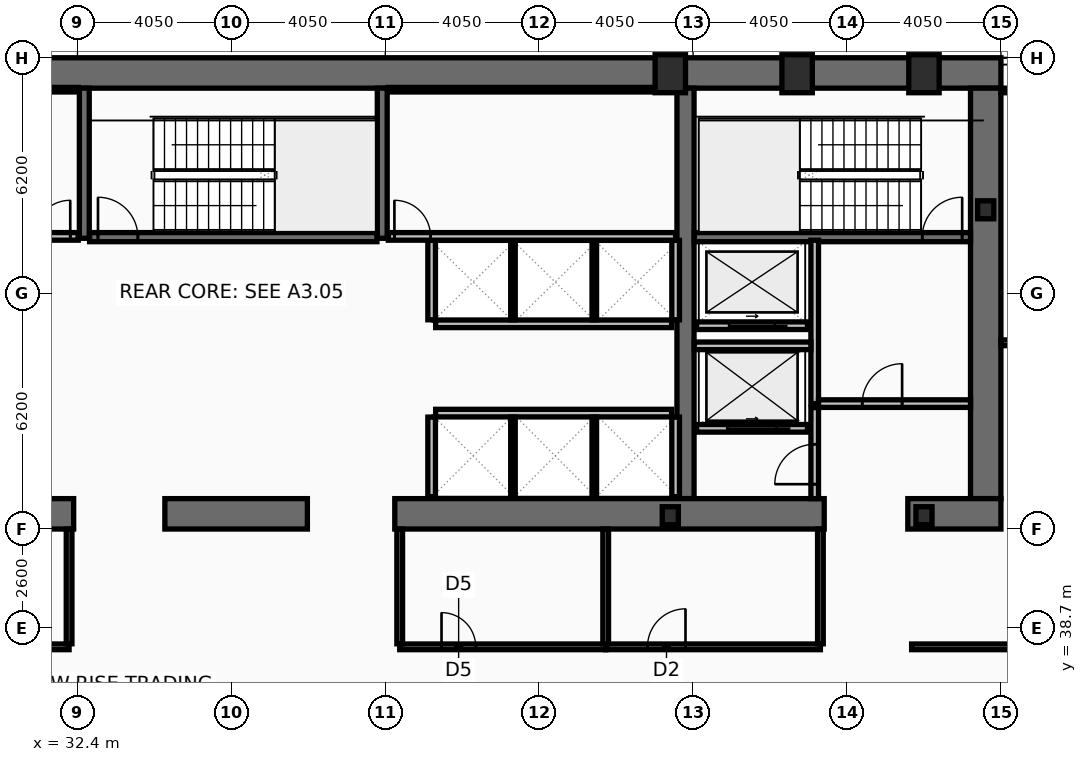
"""IFC4 building model, lengths in metres.
Left out: names, types, materials, properties, quantities, classifications, styles, units other than length and angle.
Written with IfcOpenShell. Run it as: python <this file> out.ifc"""

import sys

from ifc_helpers import new_model, si_unit, direction, frame, frame_2d, origin, origin_2d, place, context, subcontext, project, spatial, rectangle, hollow_rectangle, i_section, extrude, element, fill, save


model = new_model("IFC4")
c1 = context("Model", 3, precision=1e-05, world=origin(), true_north=direction((0.0, 1.0)))
c2 = subcontext(c1, "Body", "Model", "MODEL_VIEW")
j1 = project(units=[si_unit("LENGTHUNIT", "METRE"), si_unit("PLANEANGLEUNIT", "RADIAN")], contexts=[c1])
p1 = place(None, origin())
s1 = spatial("IfcSite", under=j1, at=p1, CompositionType="ELEMENT")
p2 = place(p1, origin())
s2 = spatial("IfcBuilding", under=s1, at=p2, CompositionType="ELEMENT")
p3 = place(p2, frame((0.0, 0.0, 45.8)))
s3 = spatial("IfcBuildingStorey", under=s2, at=p3, CompositionType="ELEMENT", Elevation=45.8)
p4 = place(p3, frame((16.2, 53.3, 0.0), z_axis=(0.0, 0.0, 1.0), x_axis=(1.0, 0.0, 0.0)))
e1 = element("IfcWall", 1, at=p4, inside=s3, PredefinedType="SHEAR", context=c2, shape_type="SweptSolid", body=[
    extrude(rectangle(XDim=40.5, YDim=0.8, at=frame_2d((20.25, 0.0))), origin(), (0.0, 0.0, 1.0), 3.82),
])
p5 = place(p3, frame((56.3, 52.9, 0.0), z_axis=(0.0, 0.0, 1.0), x_axis=(0.0, -1.0, 0.0)))
e2 = element("IfcWall", 2, at=p5, inside=s3, PredefinedType="SHEAR", context=c2, shape_type="SweptSolid", body=[
    extrude(rectangle(XDim=10.8, YDim=0.8, at=frame_2d((5.4, 0.0))), origin(), (0.0, 0.0, 1.0), 3.82),
])
p6 = place(p3, frame((48.4, 42.1, 0.0), z_axis=(0.0, 0.0, 1.0), x_axis=(0.0, 1.0, 0.0)))
e3 = element("IfcWall", 3, at=p6, inside=s3, PredefinedType="SHEAR", context=c2, shape_type="SweptSolid", body=[
    extrude(rectangle(XDim=10.8, YDim=0.45, at=frame_2d((5.4, 0.0))), origin(), (0.0, 0.0, 1.0), 3.82),
])
p7 = place(p3, frame((32.3, 41.7, 0.0), z_axis=(0.0, 0.0, 1.0), x_axis=(-1.0, 0.0, 0.0)))
e4 = element("IfcWall", 4, at=p7, inside=s3, PredefinedType="SHEAR", context=c2, shape_type="SweptSolid", body=[
    extrude(rectangle(XDim=11.45, YDim=0.8, at=frame_2d((5.725, 0.0))), origin(), (0.0, 0.0, 1.0), 3.82),
])
p8 = place(p3, frame((38.45, 41.7, 0.0), z_axis=(0.0, 0.0, 1.0), x_axis=(-1.0, 0.0, 0.0)))
e5 = element("IfcWall", 5, at=p8, inside=s3, PredefinedType="SHEAR", context=c2, shape_type="SweptSolid", body=[
    extrude(rectangle(XDim=3.75, YDim=0.8, at=frame_2d((1.875, 0.0))), origin(), (0.0, 0.0, 1.0), 3.82),
])
p9 = place(p3, frame((52.05, 41.7, 0.0), z_axis=(0.0, 0.0, 1.0), x_axis=(-1.0, 0.0, 0.0)))
e6 = element("IfcWall", 6, at=p9, inside=s3, PredefinedType="SHEAR", context=c2, shape_type="SweptSolid", body=[
    extrude(rectangle(XDim=11.3, YDim=0.8, at=frame_2d((5.65, 0.0))), origin(), (0.0, 0.0, 1.0), 3.82),
])
p10 = place(p3, frame((56.7, 41.7, 0.0), z_axis=(0.0, 0.0, 1.0), x_axis=(-1.0, 0.0, 0.0)))
e7 = element("IfcWall", 7, at=p10, inside=s3, PredefinedType="SHEAR", context=c2, shape_type="SweptSolid", body=[
    extrude(rectangle(XDim=2.45, YDim=0.8, at=frame_2d((1.225, 0.0))), origin(), (0.0, 0.0, 1.0), 3.82),
])
for number, where, z_axis, x_axis in (
    (8, (32.58, 48.95, 0.0), (0.0, 0.0, 1.0), (0.0, 1.0, 0.0)),
    (9, (40.42, 48.95, 0.0), (0.0, 0.0, 1.0), (0.0, 1.0, 0.0)),
):
    element("IfcWall", number, at=place(p3, frame(where, z_axis=z_axis, x_axis=x_axis)), inside=s3, PredefinedType="SHEAR", context=c2, shape_type="SweptSolid", body=[
        extrude(rectangle(XDim=3.95, YDim=0.26, at=frame_2d((1.975, 0.0))), origin(), (0.0, 0.0, 1.0), 3.82),
    ])
p11 = place(p3, frame((48.63, 48.98, 0.0), z_axis=(0.0, 0.0, 1.0), x_axis=(1.0, 0.0, 0.0)))
e10 = element("IfcWall", 10, at=p11, inside=s3, PredefinedType="SHEAR", context=c2, shape_type="SweptSolid", body=[
    extrude(rectangle(XDim=7.27, YDim=0.24, at=frame_2d((3.635, 0.0))), origin(), (0.0, 0.0, 1.0), 3.82),
])
p12 = place(p11, frame((6.0, 0.0, 0.0)))
e11 = element("IfcOpeningElement", 11, at=p12, cuts=e10, PredefinedType="OPENING", context=c2, shape_type="SweptSolid", body=[
    extrude(rectangle(XDim=1.05, YDim=2.15, at=frame_2d((0.525, 1.075))), frame((0.0, 0.13, 0.0), z_axis=(0.0, -1.0, 0.0), x_axis=(1.0, 0.0, 0.0)), (0.0, 0.0, 1.0), 0.26),
])
p13 = place(p3, frame((32.72, 48.98, 0.0), z_axis=(0.0, 0.0, 1.0), x_axis=(1.0, 0.0, 0.0)))
e12 = element("IfcWall", 12, at=p13, inside=s3, PredefinedType="SHEAR", context=c2, shape_type="SweptSolid", body=[
    extrude(rectangle(XDim=7.56, YDim=0.24, at=frame_2d((3.78, 0.0))), origin(), (0.0, 0.0, 1.0), 3.82),
])
p14 = place(p13, frame((0.22, 0.0, 0.0)))
e13 = element("IfcOpeningElement", 13, at=p14, cuts=e12, PredefinedType="OPENING", context=c2, shape_type="SweptSolid", body=[
    extrude(rectangle(XDim=1.05, YDim=2.15, at=frame_2d((0.525, 1.075))), frame((0.0, 0.13, 0.0), z_axis=(0.0, -1.0, 0.0), x_axis=(1.0, 0.0, 0.0)), (0.0, 0.0, 1.0), 0.26),
])
for number, where, z_axis, x_axis in (
    (14, (48.0, 53.28, 0.0), (0.0, 0.0, 1.0), (1.0, 0.0, 0.0)),
    (15, (51.337, 53.28, 0.0), (0.0, 0.0, 1.0), (1.0, 0.0, 0.0)),
    (16, (54.675, 53.28, 0.0), (0.0, 0.0, 1.0), (1.0, 0.0, 0.0)),
):
    element("IfcColumn", number, at=place(p3, frame(where, z_axis=z_axis, x_axis=x_axis)), inside=s3, PredefinedType="COLUMN", context=c2, shape_type="SweptSolid", body=[
        extrude(hollow_rectangle(XDim=0.8, YDim=1.0, WallThickness=0.055, at=origin_2d()), origin(), (0.0, 0.0, 1.0), 4.0),
    ])
for number, where, z_axis, x_axis in (
    (17, (56.3, 49.7, 0.0), (0.0, 0.0, 1.0), (1.0, 0.0, 0.0)),
    (18, (48.0, 41.65, 0.0), (0.0, 0.0, 1.0), (1.0, 0.0, 0.0)),
    (19, (54.675, 41.65, 0.0), (0.0, 0.0, 1.0), (1.0, 0.0, 0.0)),
):
    element("IfcColumn", number, at=place(p3, frame(where, z_axis=z_axis, x_axis=x_axis)), inside=s3, PredefinedType="COLUMN", context=c2, shape_type="SweptSolid", body=[
        extrude(i_section(OverallWidth=0.424, OverallDepth=0.474, WebThickness=0.048, FlangeThickness=0.077, at=origin_2d()), origin(), (0.0, 0.0, 1.0), 4.0),
    ])
p15 = place(p3, frame((51.61, 43.95, 0.0), z_axis=(0.0, 0.0, 1.0), x_axis=(-1.0, 0.0, 0.0)))
e20 = element("IfcWall", 20, at=p15, inside=s3, PredefinedType="PARTITIONING", context=c2, shape_type="SweptSolid", body=[
    extrude(rectangle(XDim=2.92, YDim=0.2, at=frame_2d((1.46, 0.0))), origin(), (0.0, 0.0, 1.0), 3.82),
])
p16 = place(p15, frame((0.81, 0.0, 0.0)))
e21 = element("IfcOpeningElement", 21, at=p16, cuts=e20, PredefinedType="OPENING", context=c2, shape_type="SweptSolid", body=[
    extrude(rectangle(XDim=1.3, YDim=2.18, at=frame_2d((0.65, 1.09))), frame((0.0, 0.11, 0.0), z_axis=(0.0, -1.0, 0.0), x_axis=(1.0, 0.0, 0.0)), (0.0, 0.0, 1.0), 0.22),
])
p17 = place(p3, frame((51.61, 46.65, 0.0), z_axis=(0.0, 0.0, 1.0), x_axis=(-1.0, 0.0, 0.0)))
e22 = element("IfcWall", 22, at=p17, inside=s3, PredefinedType="PARTITIONING", context=c2, shape_type="SweptSolid", body=[
    extrude(rectangle(XDim=2.92, YDim=0.2, at=frame_2d((1.46, 0.0))), origin(), (0.0, 0.0, 1.0), 3.82),
])
p18 = place(p17, frame((0.86, 0.0, 0.0)))
e23 = element("IfcOpeningElement", 23, at=p18, cuts=e22, PredefinedType="OPENING", context=c2, shape_type="SweptSolid", body=[
    extrude(rectangle(XDim=1.2, YDim=2.18, at=frame_2d((0.6, 1.09))), frame((0.0, 0.11, 0.0), z_axis=(0.0, -1.0, 0.0), x_axis=(1.0, 0.0, 0.0)), (0.0, 0.0, 1.0), 0.22),
])
p19 = place(p3, frame((51.8, 44.6, 0.0), z_axis=(0.0, 0.0, 1.0), x_axis=(0.0, 1.0, 0.0)))
e24 = element("IfcWall", 24, at=p19, inside=s3, PredefinedType="PARTITIONING", context=c2, shape_type="SweptSolid", body=[
    extrude(rectangle(XDim=4.3, YDim=0.2, at=frame_2d((2.15, 0.0))), origin(), (0.0, 0.0, 1.0), 3.82),
])
p20 = place(p3, frame((51.9, 44.6, 0.0), z_axis=(0.0, 0.0, 1.0), x_axis=(1.0, 0.0, 0.0)))
e25 = element("IfcWall", 25, at=p20, inside=s3, PredefinedType="PARTITIONING", context=c2, shape_type="SweptSolid", body=[
    extrude(rectangle(XDim=4.0, YDim=0.2, at=frame_2d((2.0, 0.0))), origin(), (0.0, 0.0, 1.0), 3.82),
])
p21 = place(p20, frame((1.15, 0.0, 0.0)))
e26 = element("IfcOpeningElement", 26, at=p21, cuts=e25, PredefinedType="OPENING", context=c2, shape_type="SweptSolid", body=[
    extrude(rectangle(XDim=1.05, YDim=2.15, at=frame_2d((0.525, 1.075))), frame((0.0, 0.11, 0.0), z_axis=(0.0, -1.0, 0.0), x_axis=(1.0, 0.0, 0.0)), (0.0, 0.0, 1.0), 0.22),
])
p22 = place(p3, frame((48.63, 46.12, 0.0), z_axis=(0.0, 0.0, 1.0), x_axis=(1.0, 0.0, 0.0)))
e27 = element("IfcWall", 27, at=p22, inside=s3, PredefinedType="PARTITIONING", context=c2, shape_type="SweptSolid", body=[
    extrude(rectangle(XDim=3.07, YDim=0.2, at=frame_2d((1.535, 0.0))), origin(), (0.0, 0.0, 1.0), 3.82),
])
p23 = place(p3, frame((51.8, 42.1, 0.0), z_axis=(0.0, 0.0, 1.0), x_axis=(0.0, 1.0, 0.0)))
e28 = element("IfcWall", 28, at=p23, inside=s3, PredefinedType="PARTITIONING", context=c2, shape_type="SweptSolid", body=[
    extrude(rectangle(XDim=2.395, YDim=0.2, at=frame_2d((1.198, 0.0))), origin(), (0.0, 0.0, 1.0), 3.82),
])
p24 = place(p23, frame((0.38, 0.0, 0.0)))
e29 = element("IfcOpeningElement", 29, at=p24, cuts=e28, PredefinedType="OPENING", context=c2, shape_type="SweptSolid", body=[
    extrude(rectangle(XDim=1.05, YDim=2.15, at=frame_2d((0.525, 1.075))), frame((0.0, 0.11, 0.0), z_axis=(0.0, -1.0, 0.0), x_axis=(1.0, 0.0, 0.0)), (0.0, 0.0, 1.0), 0.22),
])
p25 = place(p3, frame((41.825, 46.7, 0.0), z_axis=(0.0, 0.0, 1.0), x_axis=(1.0, 0.0, 0.0)))
e30 = element("IfcWall", 30, at=p25, inside=s3, PredefinedType="PARTITIONING", context=c2, shape_type="SweptSolid", body=[
    extrude(rectangle(XDim=6.21, YDim=0.2, at=frame_2d((3.105, 0.0))), origin(), (0.0, 0.0, 1.0), 3.82),
])
for number, where, z_axis, x_axis in (
    (31, (41.72, 46.805, 0.0), (0.0, 0.0, 1.0), (0.0, 1.0, 0.0)),
    (32, (48.14, 46.805, 0.0), (0.0, 0.0, 1.0), (0.0, 1.0, 0.0)),
):
    element("IfcWall", number, at=place(p3, frame(where, z_axis=z_axis, x_axis=x_axis)), inside=s3, PredefinedType="PARTITIONING", context=c2, shape_type="SweptSolid", body=[
        extrude(rectangle(XDim=2.09, YDim=0.2, at=frame_2d((1.045, 0.0))), origin(), (0.0, 0.0, 1.0), 3.82),
    ])
for number, where, z_axis, x_axis in (
    (33, (43.86, 46.805, 0.0), (0.0, 0.0, 1.0), (0.0, 1.0, 0.0)),
    (34, (46.0, 46.805, 0.0), (0.0, 0.0, 1.0), (0.0, 1.0, 0.0)),
):
    element("IfcWall", number, at=place(p3, frame(where, z_axis=z_axis, x_axis=x_axis)), inside=s3, PredefinedType="PARTITIONING", context=c2, shape_type="SweptSolid", body=[
        extrude(rectangle(XDim=2.09, YDim=0.12, at=frame_2d((1.045, 0.0))), origin(), (0.0, 0.0, 1.0), 3.82),
    ])
p26 = place(p3, frame((41.825, 44.35, 0.0), z_axis=(0.0, 0.0, 1.0), x_axis=(1.0, 0.0, 0.0)))
e35 = element("IfcWall", 35, at=p26, inside=s3, PredefinedType="PARTITIONING", context=c2, shape_type="SweptSolid", body=[
    extrude(rectangle(XDim=6.21, YDim=0.2, at=frame_2d((3.105, 0.0))), origin(), (0.0, 0.0, 1.0), 3.82),
])
for number, where, z_axis, x_axis in (
    (36, (41.72, 42.15, 0.0), (0.0, 0.0, 1.0), (0.0, 1.0, 0.0)),
    (37, (48.14, 42.15, 0.0), (0.0, 0.0, 1.0), (0.0, 1.0, 0.0)),
):
    element("IfcWall", number, at=place(p3, frame(where, z_axis=z_axis, x_axis=x_axis)), inside=s3, PredefinedType="PARTITIONING", context=c2, shape_type="SweptSolid", body=[
        extrude(rectangle(XDim=2.095, YDim=0.2, at=frame_2d((1.048, 0.0))), origin(), (0.0, 0.0, 1.0), 3.82),
    ])
for number, where, z_axis, x_axis in (
    (38, (43.86, 42.15, 0.0), (0.0, 0.0, 1.0), (0.0, 1.0, 0.0)),
    (39, (46.0, 42.15, 0.0), (0.0, 0.0, 1.0), (0.0, 1.0, 0.0)),
):
    element("IfcWall", number, at=place(p3, frame(where, z_axis=z_axis, x_axis=x_axis)), inside=s3, PredefinedType="PARTITIONING", context=c2, shape_type="SweptSolid", body=[
        extrude(rectangle(XDim=2.095, YDim=0.12, at=frame_2d((1.048, 0.0))), origin(), (0.0, 0.0, 1.0), 3.82),
    ])
p27 = place(p3, frame((24.7, 52.86, 0.0), z_axis=(0.0, 0.0, 1.0), x_axis=(1.0, 0.0, 0.0)))
e40 = element("IfcWall", 40, at=p27, inside=s3, PredefinedType="PARTITIONING", context=c2, shape_type="SweptSolid", body=[
    extrude(rectangle(XDim=7.72, YDim=0.12, at=frame_2d((3.86, 0.0))), origin(), (0.0, 0.0, 1.0), 3.82),
])
p28 = place(p3, frame((24.7, 49.0, 0.0), z_axis=(0.0, 0.0, 1.0), x_axis=(1.0, 0.0, 0.0)))
e41 = element("IfcWall", 41, at=p28, inside=s3, PredefinedType="PARTITIONING", context=c2, shape_type="SweptSolid", body=[
    extrude(rectangle(XDim=7.72, YDim=0.2, at=frame_2d((3.86, 0.0))), origin(), (0.0, 0.0, 1.0), 3.82),
])
p29 = place(p28, frame((6.56, 0.0, 0.0)))
e42 = element("IfcOpeningElement", 42, at=p29, cuts=e41, PredefinedType="OPENING", context=c2, shape_type="SweptSolid", body=[
    extrude(rectangle(XDim=0.95, YDim=2.1, at=frame_2d((0.475, 1.05))), frame((0.0, 0.11, 0.0), z_axis=(0.0, -1.0, 0.0), x_axis=(1.0, 0.0, 0.0)), (0.0, 0.0, 1.0), 0.22),
])
p30 = place(p3, frame((40.58, 52.86, 0.0), z_axis=(0.0, 0.0, 1.0), x_axis=(1.0, 0.0, 0.0)))
e43 = element("IfcWall", 43, at=p30, inside=s3, PredefinedType="PARTITIONING", context=c2, shape_type="SweptSolid", body=[
    extrude(rectangle(XDim=7.56, YDim=0.12, at=frame_2d((3.78, 0.0))), origin(), (0.0, 0.0, 1.0), 3.82),
])
p31 = place(p3, frame((40.58, 49.0, 0.0), z_axis=(0.0, 0.0, 1.0), x_axis=(1.0, 0.0, 0.0)))
e44 = element("IfcWall", 44, at=p31, inside=s3, PredefinedType="PARTITIONING", context=c2, shape_type="SweptSolid", body=[
    extrude(rectangle(XDim=7.56, YDim=0.2, at=frame_2d((3.78, 0.0))), origin(), (0.0, 0.0, 1.0), 3.82),
])
p32 = place(p31, frame((0.16, 0.0, 0.0)))
e45 = element("IfcOpeningElement", 45, at=p32, cuts=e44, PredefinedType="OPENING", context=c2, shape_type="SweptSolid", body=[
    extrude(rectangle(XDim=0.95, YDim=2.1, at=frame_2d((0.475, 1.05))), frame((0.0, 0.11, 0.0), z_axis=(0.0, -1.0, 0.0), x_axis=(1.0, 0.0, 0.0)), (0.0, 0.0, 1.0), 0.22),
])
p33 = place(p3, frame((28.8, 38.2, 0.0), z_axis=(0.0, 0.0, 1.0), x_axis=(1.0, 0.0, 0.0)))
e46 = element("IfcWall", 46, at=p33, inside=s3, PredefinedType="PARTITIONING", context=c2, shape_type="SweptSolid", body=[
    extrude(rectangle(XDim=3.38, YDim=0.15, at=frame_2d((1.69, 0.0))), origin(), (0.0, 0.0, 1.0), 3.01),
])
p34 = place(p33, frame((0.7, 0.0, 0.0)))
e47 = element("IfcOpeningElement", 47, at=p34, cuts=e46, PredefinedType="OPENING", context=c2, shape_type="SweptSolid", body=[
    extrude(rectangle(XDim=0.95, YDim=2.05, at=frame_2d((0.475, 1.025))), frame((0.0, 0.085, 0.0), z_axis=(0.0, -1.0, 0.0), x_axis=(1.0, 0.0, 0.0)), (0.0, 0.0, 1.0), 0.17),
])
p35 = place(p3, frame((32.18, 38.28, 0.0), z_axis=(0.0, 0.0, 1.0), x_axis=(0.0, 1.0, 0.0)))
e48 = element("IfcWall", 48, at=p35, inside=s3, PredefinedType="PARTITIONING", context=c2, shape_type="SweptSolid", body=[
    extrude(rectangle(XDim=3.02, YDim=0.15, at=frame_2d((1.51, 0.0))), origin(), (0.0, 0.0, 1.0), 3.82),
])
p36 = place(p3, frame((40.88, 38.2, 0.0), z_axis=(0.0, 0.0, 1.0), x_axis=(1.0, 0.0, 0.0)))
e49 = element("IfcWall", 49, at=p36, inside=s3, PredefinedType="PARTITIONING", context=c2, shape_type="SweptSolid", body=[
    extrude(rectangle(XDim=5.42, YDim=0.15, at=frame_2d((2.71, 0.0))), origin(), (0.0, 0.0, 1.0), 3.01),
])
p37 = place(p36, frame((1.1, 0.0, 0.0)))
e50 = element("IfcOpeningElement", 50, at=p37, cuts=e49, PredefinedType="OPENING", context=c2, shape_type="SweptSolid", body=[
    extrude(rectangle(XDim=0.9, YDim=2.05, at=frame_2d((0.45, 1.025))), frame((0.0, 0.085, 0.0), z_axis=(0.0, -1.0, 0.0), x_axis=(1.0, 0.0, 0.0)), (0.0, 0.0, 1.0), 0.17),
])
p38 = place(p3, frame((46.3, 38.2, 0.0), z_axis=(0.0, 0.0, 1.0), x_axis=(1.0, 0.0, 0.0)))
e51 = element("IfcWall", 51, at=p38, inside=s3, PredefinedType="PARTITIONING", context=c2, shape_type="SweptSolid", body=[
    extrude(rectangle(XDim=5.65, YDim=0.15, at=frame_2d((2.825, 0.0))), origin(), (0.0, 0.0, 1.0), 3.01),
])
p39 = place(p38, frame((1.1, 0.0, 0.0)))
e52 = element("IfcOpeningElement", 52, at=p39, cuts=e51, PredefinedType="OPENING", context=c2, shape_type="SweptSolid", body=[
    extrude(rectangle(XDim=1.0, YDim=2.05, at=frame_2d((0.5, 1.025))), frame((0.0, 0.085, 0.0), z_axis=(0.0, -1.0, 0.0), x_axis=(1.0, 0.0, 0.0)), (0.0, 0.0, 1.0), 0.17),
])
for number, where, z_axis, x_axis in (
    (53, (40.88, 38.28, 0.0), (0.0, 0.0, 1.0), (0.0, 1.0, 0.0)),
    (54, (46.3, 38.28, 0.0), (0.0, 0.0, 1.0), (0.0, 1.0, 0.0)),
    (55, (51.95, 38.28, 0.0), (0.0, 0.0, 1.0), (0.0, 1.0, 0.0)),
):
    element("IfcWall", number, at=place(p3, frame(where, z_axis=z_axis, x_axis=x_axis)), inside=s3, PredefinedType="PARTITIONING", context=c2, shape_type="SweptSolid", body=[
        extrude(rectangle(XDim=3.02, YDim=0.15, at=frame_2d((1.51, 0.0))), origin(), (0.0, 0.0, 1.0), 3.82),
    ])
p40 = place(p3, frame((54.35, 38.2, 0.0), z_axis=(0.0, 0.0, 1.0), x_axis=(1.0, 0.0, 0.0)))
e56 = element("IfcWall", 56, at=p40, inside=s3, PredefinedType="PARTITIONING", context=c2, shape_type="SweptSolid", body=[
    extrude(rectangle(XDim=16.52, YDim=0.15, at=frame_2d((8.26, 0.0))), origin(), (0.0, 0.0, 1.0), 3.01),
])
p41 = place(p40, frame((3.25, 0.0, 0.0)))
e57 = element("IfcOpeningElement", 57, at=p41, cuts=e56, PredefinedType="OPENING", context=c2, shape_type="SweptSolid", body=[
    extrude(rectangle(XDim=0.95, YDim=2.05, at=frame_2d((0.475, 1.025))), frame((0.0, 0.085, 0.0), z_axis=(0.0, -1.0, 0.0), x_axis=(1.0, 0.0, 0.0)), (0.0, 0.0, 1.0), 0.17),
])
p42 = place(p3, frame((56.7, 46.2, 0.0), z_axis=(0.0, 0.0, 1.0), x_axis=(1.0, 0.0, 0.0)))
e58 = element("IfcWall", 58, at=p42, inside=s3, PredefinedType="PARTITIONING", context=c2, shape_type="SweptSolid", body=[
    extrude(rectangle(XDim=14.105, YDim=0.15, at=frame_2d((7.052, 0.0))), origin(), (0.0, 0.0, 1.0), 3.16),
])
p43 = place(p42, frame((0.9, 0.0, 0.0)))
e59 = element("IfcOpeningElement", 59, at=p43, cuts=e58, PredefinedType="OPENING", context=c2, shape_type="SweptSolid", body=[
    extrude(rectangle(XDim=0.9, YDim=2.05, at=frame_2d((0.45, 1.025))), frame((0.0, 0.085, 0.0), z_axis=(0.0, -1.0, 0.0), x_axis=(1.0, 0.0, 0.0)), (0.0, 0.0, 1.0), 0.17),
])
p44 = place(p3, frame((56.7, 52.84, 0.0), z_axis=(0.0, 0.0, 1.0), x_axis=(1.0, 0.0, 0.0)))
e60 = element("IfcWall", 60, at=p44, inside=s3, PredefinedType="PARTITIONING", context=c2, shape_type="SweptSolid", body=[
    extrude(rectangle(XDim=14.105, YDim=0.12, at=frame_2d((7.052, 0.0))), origin(), (0.0, 0.0, 1.0), 3.82),
])
p45 = place(p12, origin())
e61 = element("IfcDoor", 61, at=p45, inside=s3, OperationType="SINGLE_SWING_RIGHT", PredefinedType="DOOR", context=c2, shape_type="SweptSolid", body=[
    extrude(rectangle(XDim=1.05, YDim=2.15, at=frame_2d((0.525, 1.075))), frame((0.0, 0.025, 0.0), z_axis=(0.0, -1.0, 0.0), x_axis=(1.0, 0.0, 0.0)), (0.0, 0.0, 1.0), 0.05),
])
fill(e11, e61)
p46 = place(p14, origin())
e62 = element("IfcDoor", 62, at=p46, inside=s3, OperationType="SINGLE_SWING_LEFT", PredefinedType="DOOR", context=c2, shape_type="SweptSolid", body=[
    extrude(rectangle(XDim=1.05, YDim=2.15, at=frame_2d((0.525, 1.075))), frame((0.0, 0.025, 0.0), z_axis=(0.0, -1.0, 0.0), x_axis=(1.0, 0.0, 0.0)), (0.0, 0.0, 1.0), 0.05),
])
fill(e13, e62)
p47 = place(p16, origin())
e63 = element("IfcDoor", 63, at=p47, inside=s3, OperationType="SLIDING_TO_LEFT", PredefinedType="DOOR", context=c2, shape_type="SweptSolid", body=[
    extrude(rectangle(XDim=1.3, YDim=2.18, at=frame_2d((0.65, 1.09))), frame((0.0, 0.025, 0.0), z_axis=(0.0, -1.0, 0.0), x_axis=(1.0, 0.0, 0.0)), (0.0, 0.0, 1.0), 0.05),
])
fill(e21, e63)
p48 = place(p18, origin())
e64 = element("IfcDoor", 64, at=p48, inside=s3, OperationType="SLIDING_TO_LEFT", PredefinedType="DOOR", context=c2, shape_type="SweptSolid", body=[
    extrude(rectangle(XDim=1.2, YDim=2.18, at=frame_2d((0.6, 1.09))), frame((0.0, 0.025, 0.0), z_axis=(0.0, -1.0, 0.0), x_axis=(1.0, 0.0, 0.0)), (0.0, 0.0, 1.0), 0.05),
])
fill(e23, e64)
p49 = place(p21, origin())
e65 = element("IfcDoor", 65, at=p49, inside=s3, OperationType="SINGLE_SWING_RIGHT", PredefinedType="DOOR", context=c2, shape_type="SweptSolid", body=[
    extrude(rectangle(XDim=1.05, YDim=2.15, at=frame_2d((0.525, 1.075))), frame((0.0, 0.025, 0.0), z_axis=(0.0, -1.0, 0.0), x_axis=(1.0, 0.0, 0.0)), (0.0, 0.0, 1.0), 0.05),
])
fill(e26, e65)
p50 = place(p24, origin())
e66 = element("IfcDoor", 66, at=p50, inside=s3, OperationType="SINGLE_SWING_LEFT", PredefinedType="DOOR", context=c2, shape_type="SweptSolid", body=[
    extrude(rectangle(XDim=1.05, YDim=2.15, at=frame_2d((0.525, 1.075))), frame((0.0, 0.025, 0.0), z_axis=(0.0, -1.0, 0.0), x_axis=(1.0, 0.0, 0.0)), (0.0, 0.0, 1.0), 0.05),
])
fill(e29, e66)
p51 = place(p29, origin())
e67 = element("IfcDoor", 67, at=p51, inside=s3, OperationType="SINGLE_SWING_RIGHT", PredefinedType="DOOR", context=c2, shape_type="SweptSolid", body=[
    extrude(rectangle(XDim=0.95, YDim=2.1, at=frame_2d((0.475, 1.05))), frame((0.0, 0.025, 0.0), z_axis=(0.0, -1.0, 0.0), x_axis=(1.0, 0.0, 0.0)), (0.0, 0.0, 1.0), 0.05),
])
fill(e42, e67)
p52 = place(p32, origin())
e68 = element("IfcDoor", 68, at=p52, inside=s3, OperationType="SINGLE_SWING_LEFT", PredefinedType="DOOR", context=c2, shape_type="SweptSolid", body=[
    extrude(rectangle(XDim=0.95, YDim=2.1, at=frame_2d((0.475, 1.05))), frame((0.0, 0.025, 0.0), z_axis=(0.0, -1.0, 0.0), x_axis=(1.0, 0.0, 0.0)), (0.0, 0.0, 1.0), 0.05),
])
fill(e45, e68)
p53 = place(p37, origin())
e69 = element("IfcDoor", 69, at=p53, inside=s3, OperationType="SINGLE_SWING_LEFT", PredefinedType="DOOR", context=c2, shape_type="SweptSolid", body=[
    extrude(rectangle(XDim=0.9, YDim=2.05, at=frame_2d((0.45, 1.025))), frame((0.0, 0.025, 0.0), z_axis=(0.0, -1.0, 0.0), x_axis=(1.0, 0.0, 0.0)), (0.0, 0.0, 1.0), 0.05),
])
fill(e50, e69)
p54 = place(p39, origin())
e70 = element("IfcDoor", 70, at=p54, inside=s3, OperationType="SINGLE_SWING_RIGHT", PredefinedType="DOOR", context=c2, shape_type="SweptSolid", body=[
    extrude(rectangle(XDim=1.0, YDim=2.05, at=frame_2d((0.5, 1.025))), frame((0.0, 0.025, 0.0), z_axis=(0.0, -1.0, 0.0), x_axis=(1.0, 0.0, 0.0)), (0.0, 0.0, 1.0), 0.05),
])
fill(e52, e70)
save(model, sys.argv[1])
